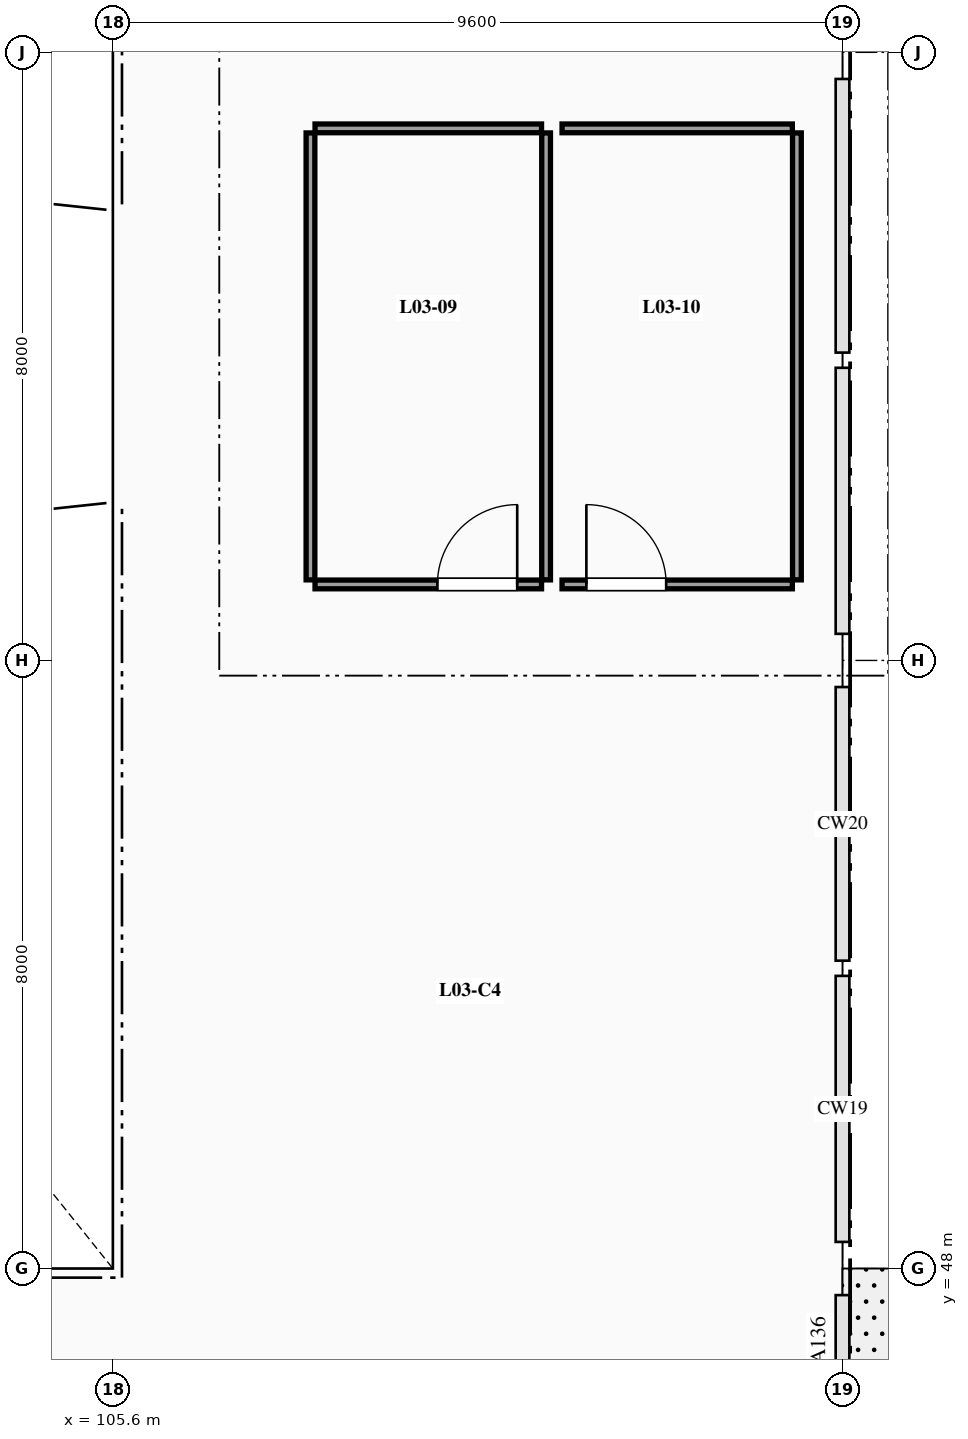
"""IFC4 building model, lengths in metres.
Left out: names, types, materials, properties, quantities, classifications, styles, units other than length and angle.
Written with IfcOpenShell. Run it as: python <this file> out.ifc"""

import sys

from ifc_helpers import new_model, si_unit, direction, frame, frame_2d, origin, place, context, subcontext, project, spatial, rectangle, extrude, element, fill, save


model = new_model("IFC4")
c1 = context("Model", 3, precision=1e-05, world=origin(), true_north=direction((0.0, 1.0)))
c2 = subcontext(c1, "Body", "Model", "MODEL_VIEW")
j1 = project(units=[si_unit("LENGTHUNIT", "METRE"), si_unit("PLANEANGLEUNIT", "RADIAN")], contexts=[c1])
p1 = place(None, origin())
s1 = spatial("IfcSite", under=j1, at=p1, CompositionType="ELEMENT")
p2 = place(p1, origin())
s2 = spatial("IfcBuilding", under=s1, at=p2, CompositionType="ELEMENT")
p3 = place(p2, frame((0.0, 0.0, 12.9)))
s3 = spatial("IfcBuildingStorey", under=s2, at=p3, CompositionType="ELEMENT", Elevation=12.9)
p4 = place(p3, frame((108.26, 63.0, 0.0), z_axis=(0.0, 0.0, 1.0), x_axis=(1.0, 0.0, 0.0)))
e1 = element("IfcWall", 1, at=p4, inside=s3, PredefinedType="PARTITIONING", context=c2, shape_type="SweptSolid", body=[
    extrude(rectangle(XDim=2.98, YDim=0.115, at=frame_2d((1.49, 0.0))), origin(), (0.0, 0.0, 1.0), 3.38),
])
p5 = place(p3, frame((108.26, 57.0, 0.0), z_axis=(0.0, 0.0, 1.0), x_axis=(1.0, 0.0, 0.0)))
e2 = element("IfcWall", 2, at=p5, inside=s3, PredefinedType="PARTITIONING", context=c2, shape_type="SweptSolid", body=[
    extrude(rectangle(XDim=2.98, YDim=0.115, at=frame_2d((1.49, 0.0))), origin(), (0.0, 0.0, 1.0), 3.38),
])
p6 = place(p5, frame((1.61, 0.0, 0.0)))
e3 = element("IfcOpeningElement", 3, at=p6, cuts=e2, PredefinedType="OPENING", context=c2, shape_type="SweptSolid", body=[
    extrude(rectangle(XDim=1.05, YDim=2.15, at=frame_2d((0.525, 1.075))), frame((0.0, 0.067, 0.0), z_axis=(0.0, -1.0, 0.0), x_axis=(1.0, 0.0, 0.0)), (0.0, 0.0, 1.0), 0.135),
])
for number, where, z_axis, x_axis in (
    (4, (108.2, 57.06, 0.0), (0.0, 0.0, 1.0), (0.0, 1.0, 0.0)),
    (5, (111.3, 57.06, 0.0), (0.0, 0.0, 1.0), (0.0, 1.0, 0.0)),
):
    element("IfcWall", number, at=place(p3, frame(where, z_axis=z_axis, x_axis=x_axis)), inside=s3, PredefinedType="PARTITIONING", context=c2, shape_type="SweptSolid", body=[
        extrude(rectangle(XDim=5.88, YDim=0.115, at=frame_2d((2.94, 0.0))), origin(), (0.0, 0.0, 1.0), 3.38),
    ])
p7 = place(p3, frame((111.51, 63.0, 0.0), z_axis=(0.0, 0.0, 1.0), x_axis=(1.0, 0.0, 0.0)))
e6 = element("IfcWall", 6, at=p7, inside=s3, PredefinedType="PARTITIONING", context=c2, shape_type="SweptSolid", body=[
    extrude(rectangle(XDim=3.03, YDim=0.115, at=frame_2d((1.515, 0.0))), origin(), (0.0, 0.0, 1.0), 3.38),
])
p8 = place(p3, frame((111.51, 57.0, 0.0), z_axis=(0.0, 0.0, 1.0), x_axis=(1.0, 0.0, 0.0)))
e7 = element("IfcWall", 7, at=p8, inside=s3, PredefinedType="PARTITIONING", context=c2, shape_type="SweptSolid", body=[
    extrude(rectangle(XDim=3.03, YDim=0.115, at=frame_2d((1.515, 0.0))), origin(), (0.0, 0.0, 1.0), 3.38),
])
p9 = place(p8, frame((0.32, 0.0, 0.0)))
e8 = element("IfcOpeningElement", 8, at=p9, cuts=e7, PredefinedType="OPENING", context=c2, shape_type="SweptSolid", body=[
    extrude(rectangle(XDim=1.05, YDim=2.15, at=frame_2d((0.525, 1.075))), frame((0.0, 0.067, 0.0), z_axis=(0.0, -1.0, 0.0), x_axis=(1.0, 0.0, 0.0)), (0.0, 0.0, 1.0), 0.135),
])
p10 = place(p3, frame((114.6, 57.06, 0.0), z_axis=(0.0, 0.0, 1.0), x_axis=(0.0, 1.0, 0.0)))
e9 = element("IfcWall", 9, at=p10, inside=s3, PredefinedType="PARTITIONING", context=c2, shape_type="SweptSolid", body=[
    extrude(rectangle(XDim=5.88, YDim=0.115, at=frame_2d((2.94, 0.0))), origin(), (0.0, 0.0, 1.0), 3.38),
])
p11 = place(p6, origin())
e10 = element("IfcDoor", 10, at=p11, inside=s3, OperationType="SINGLE_SWING_RIGHT", PredefinedType="DOOR", context=c2, shape_type="SweptSolid", body=[
    extrude(rectangle(XDim=1.05, YDim=2.15, at=frame_2d((0.525, 1.075))), frame((0.0, 0.025, 0.0), z_axis=(0.0, -1.0, 0.0), x_axis=(1.0, 0.0, 0.0)), (0.0, 0.0, 1.0), 0.05),
])
fill(e3, e10)
p12 = place(p9, origin())
e11 = element("IfcDoor", 11, at=p12, inside=s3, OperationType="SINGLE_SWING_LEFT", PredefinedType="DOOR", context=c2, shape_type="SweptSolid", body=[
    extrude(rectangle(XDim=1.05, YDim=2.15, at=frame_2d((0.525, 1.075))), frame((0.0, 0.025, 0.0), z_axis=(0.0, -1.0, 0.0), x_axis=(1.0, 0.0, 0.0)), (0.0, 0.0, 1.0), 0.05),
])
fill(e8, e11)
save(model, sys.argv[1])
